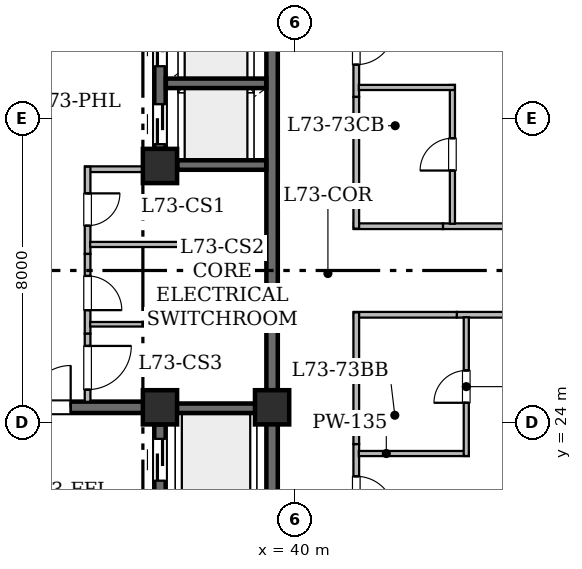
"""IFC4 building model, lengths in metres.
Left out: names, types, materials, properties, quantities, classifications, styles, units other than length and angle.
Written with IfcOpenShell. Run it as: python <this file> out.ifc"""

import sys

from ifc_helpers import new_model, si_unit, direction, frame, frame_2d, origin, origin_2d, place, context, subcontext, project, spatial, rectangle, hollow_rectangle, extrude, element, fill, save


model = new_model("IFC4")
c1 = context("Model", 3, precision=1e-05, world=origin(), true_north=direction((0.0, 1.0)))
c2 = subcontext(c1, "Body", "Model", "MODEL_VIEW")
j1 = project(units=[si_unit("LENGTHUNIT", "METRE"), si_unit("PLANEANGLEUNIT", "RADIAN")], contexts=[c1])
p1 = place(None, origin())
s1 = spatial("IfcSite", under=j1, at=p1, CompositionType="ELEMENT")
p2 = place(p1, origin())
s2 = spatial("IfcBuilding", under=s1, at=p2, CompositionType="ELEMENT")
p3 = place(p2, frame((0.0, 0.0, 286.25)))
s3 = spatial("IfcBuildingStorey", under=s2, at=p3, CompositionType="ELEMENT", Elevation=286.25)
for number, where, z_axis, x_axis in (
    (1, (36.45, 24.4, 0.0), (0.0, 0.0, 1.0), (1.0, 0.0, 0.0)),
    (2, (39.4, 24.4, 0.0), (0.0, 0.0, 1.0), (1.0, 0.0, 0.0)),
    (3, (36.45, 30.75, 0.0), (0.0, 0.0, 1.0), (1.0, 0.0, 0.0)),
):
    element("IfcColumn", number, at=place(p3, frame(where, z_axis=z_axis, x_axis=x_axis)), inside=s3, PredefinedType="COLUMN", context=c2, shape_type="SweptSolid", body=[
        extrude(hollow_rectangle(XDim=0.9, YDim=0.9, WallThickness=0.045, at=origin_2d()), origin(), (0.0, 0.0, 1.0), 4.2),
    ])
p4 = place(p3, frame((39.4, 19.0, 0.0), z_axis=(0.0, 0.0, 1.0), x_axis=(0.0, 1.0, 0.0)))
e4 = element("IfcWall", 4, at=p4, inside=s3, PredefinedType="SHEAR", context=c2, shape_type="SweptSolid", body=[
    extrude(rectangle(XDim=5.4, YDim=0.3, at=frame_2d((2.7, 0.0))), origin(), (0.0, 0.0, 1.0), 3.95),
])
p5 = place(p3, frame((39.4, 24.4, 0.0), z_axis=(0.0, 0.0, 1.0), x_axis=(0.0, 1.0, 0.0)))
e5 = element("IfcWall", 5, at=p5, inside=s3, PredefinedType="SHEAR", context=c2, shape_type="SweptSolid", body=[
    extrude(rectangle(XDim=12.6, YDim=0.3, at=frame_2d((6.3, 0.0))), origin(), (0.0, 0.0, 1.0), 3.95),
])
p6 = place(p3, frame((32.65, 24.4, 0.0), z_axis=(0.0, 0.0, 1.0), x_axis=(1.0, 0.0, 0.0)))
e6 = element("IfcWall", 6, at=p6, inside=s3, PredefinedType="SHEAR", context=c2, shape_type="SweptSolid", body=[
    extrude(rectangle(XDim=3.8, YDim=0.3, at=frame_2d((1.9, 0.0))), origin(), (0.0, 0.0, 1.0), 3.95),
])
p7 = place(p6, frame((0.35, 0.0, 0.0)))
e7 = element("IfcOpeningElement", 7, at=p7, cuts=e6, PredefinedType="OPENING", context=c2, shape_type="SweptSolid", body=[
    extrude(rectangle(XDim=1.1, YDim=2.15, at=frame_2d((0.55, 1.075))), frame((0.0, 0.16, 0.0), z_axis=(0.0, -1.0, 0.0), x_axis=(1.0, 0.0, 0.0)), (0.0, 0.0, 1.0), 0.32),
])
p8 = place(p3, frame((36.45, 19.154, 0.0), z_axis=(0.0, 0.0, 1.0), x_axis=(0.0, 1.0, 0.0)))
e8 = element("IfcWall", 8, at=p8, inside=s3, PredefinedType="SHEAR", context=c2, shape_type="SweptSolid", body=[
    extrude(rectangle(XDim=4.796, YDim=0.3, at=frame_2d((2.398, 0.0))), origin(), (0.0, 0.0, 1.0), 3.95),
])
p9 = place(p8, frame((0.696, 0.0, 0.0)))
e9 = element("IfcOpeningElement", 9, at=p9, cuts=e8, PredefinedType="OPENING", context=c2, shape_type="SweptSolid", body=[
    extrude(rectangle(XDim=1.1, YDim=2.15, at=frame_2d((0.55, 1.075))), frame((0.0, 0.16, 0.0), z_axis=(0.0, -1.0, 0.0), x_axis=(1.0, 0.0, 0.0)), (0.0, 0.0, 1.0), 0.32),
])
p10 = place(p8, frame((3.316, 0.0, 0.0)))
e10 = element("IfcOpeningElement", 10, at=p10, cuts=e8, PredefinedType="OPENING", context=c2, shape_type="SweptSolid", body=[
    extrude(rectangle(XDim=1.1, YDim=2.15, at=frame_2d((0.55, 1.075))), frame((0.0, 0.16, 0.0), z_axis=(0.0, -1.0, 0.0), x_axis=(1.0, 0.0, 0.0)), (0.0, 0.0, 1.0), 0.32),
])
p11 = place(p3, frame((36.45, 31.2, 0.0), z_axis=(0.0, 0.0, 1.0), x_axis=(0.0, 1.0, 0.0)))
e11 = element("IfcWall", 11, at=p11, inside=s3, PredefinedType="SHEAR", context=c2, shape_type="SweptSolid", body=[
    extrude(rectangle(XDim=5.646, YDim=0.3, at=frame_2d((2.823, 0.0))), origin(), (0.0, 0.0, 1.0), 3.95),
])
p12 = place(p11, frame((0.125, 0.0, 0.0)))
e12 = element("IfcOpeningElement", 12, at=p12, cuts=e11, PredefinedType="OPENING", context=c2, shape_type="SweptSolid", body=[
    extrude(rectangle(XDim=1.05, YDim=2.15, at=frame_2d((0.525, 1.075))), frame((0.0, 0.16, 0.0), z_axis=(0.0, -1.0, 0.0), x_axis=(1.0, 0.0, 0.0)), (0.0, 0.0, 1.0), 0.32),
])
p13 = place(p11, frame((2.175, 0.0, 0.0)))
e13 = element("IfcOpeningElement", 13, at=p13, cuts=e11, PredefinedType="OPENING", context=c2, shape_type="SweptSolid", body=[
    extrude(rectangle(XDim=1.05, YDim=2.15, at=frame_2d((0.525, 1.075))), frame((0.0, 0.16, 0.0), z_axis=(0.0, -1.0, 0.0), x_axis=(1.0, 0.0, 0.0)), (0.0, 0.0, 1.0), 0.32),
])
p14 = place(p11, frame((4.195, 0.0, 0.0)))
e14 = element("IfcOpeningElement", 14, at=p14, cuts=e11, PredefinedType="OPENING", context=c2, shape_type="SweptSolid", body=[
    extrude(rectangle(XDim=1.05, YDim=2.15, at=frame_2d((0.525, 1.075))), frame((0.0, 0.16, 0.0), z_axis=(0.0, -1.0, 0.0), x_axis=(1.0, 0.0, 0.0)), (0.0, 0.0, 1.0), 0.32),
])
p15 = place(p3, frame((36.604, 24.375, 0.0), z_axis=(0.0, 0.0, 1.0), x_axis=(1.0, 0.0, 0.0)))
e15 = element("IfcWall", 15, at=p15, inside=s3, PredefinedType="SHEAR", context=c2, shape_type="SweptSolid", body=[
    extrude(rectangle(XDim=2.642, YDim=0.25, at=frame_2d((1.321, 0.0))), origin(), (0.0, 0.0, 1.0), 3.95),
])
p16 = place(p3, frame((36.904, 30.775, 0.0), z_axis=(0.0, 0.0, 1.0), x_axis=(1.0, 0.0, 0.0)))
e16 = element("IfcWall", 16, at=p16, inside=s3, PredefinedType="SHEAR", context=c2, shape_type="SweptSolid", body=[
    extrude(rectangle(XDim=2.342, YDim=0.25, at=frame_2d((1.171, 0.0))), origin(), (0.0, 0.0, 1.0), 3.95),
])
p17 = place(p3, frame((36.604, 32.925, 0.0), z_axis=(0.0, 0.0, 1.0), x_axis=(1.0, 0.0, 0.0)))
e17 = element("IfcWall", 17, at=p17, inside=s3, PredefinedType="SHEAR", context=c2, shape_type="SweptSolid", body=[
    extrude(rectangle(XDim=2.642, YDim=0.25, at=frame_2d((1.321, 0.0))), origin(), (0.0, 0.0, 1.0), 3.95),
])
p18 = place(p3, frame((36.3, 30.665, 0.0), z_axis=(0.0, 0.0, 1.0), x_axis=(-1.0, 0.0, 0.0)))
e18 = element("IfcWall", 18, at=p18, inside=s3, PredefinedType="STANDARD", context=c2, shape_type="SweptSolid", body=[
    extrude(rectangle(XDim=1.82, YDim=0.15, at=frame_2d((0.91, 0.0))), origin(), (0.0, 0.0, 1.0), 3.95),
])
p19 = place(p3, frame((34.545, 30.73, 0.0), z_axis=(0.0, 0.0, 1.0), x_axis=(0.0, -1.0, 0.0)))
e19 = element("IfcWall", 19, at=p19, inside=s3, PredefinedType="STANDARD", context=c2, shape_type="SweptSolid", body=[
    extrude(rectangle(XDim=2.294, YDim=0.15, at=frame_2d((1.147, 0.0))), origin(), (0.0, 0.0, 1.0), 3.95),
])
p20 = place(p19, frame((0.701, 0.0, 0.0)))
e20 = element("IfcOpeningElement", 20, at=p20, cuts=e19, PredefinedType="OPENING", context=c2, shape_type="SweptSolid", body=[
    extrude(rectangle(XDim=0.85, YDim=2.1, at=frame_2d((0.425, 1.05))), frame((0.0, 0.085, 0.0), z_axis=(0.0, -1.0, 0.0), x_axis=(1.0, 0.0, 0.0)), (0.0, 0.0, 1.0), 0.17),
])
p21 = place(p3, frame((34.545, 28.436, 0.0), z_axis=(0.0, 0.0, 1.0), x_axis=(0.0, -1.0, 0.0)))
e21 = element("IfcWall", 21, at=p21, inside=s3, PredefinedType="STANDARD", context=c2, shape_type="SweptSolid", body=[
    extrude(rectangle(XDim=2.1, YDim=0.15, at=frame_2d((1.05, 0.0))), origin(), (0.0, 0.0, 1.0), 3.95),
])
p22 = place(p21, frame((0.579, 0.0, 0.0)))
e22 = element("IfcOpeningElement", 22, at=p22, cuts=e21, PredefinedType="OPENING", context=c2, shape_type="SweptSolid", body=[
    extrude(rectangle(XDim=0.9, YDim=2.1, at=frame_2d((0.45, 1.05))), frame((0.0, 0.085, 0.0), z_axis=(0.0, -1.0, 0.0), x_axis=(1.0, 0.0, 0.0)), (0.0, 0.0, 1.0), 0.17),
])
p23 = place(p3, frame((34.545, 26.336, 0.0), z_axis=(0.0, 0.0, 1.0), x_axis=(0.0, -1.0, 0.0)))
e23 = element("IfcWall", 23, at=p23, inside=s3, PredefinedType="STANDARD", context=c2, shape_type="SweptSolid", body=[
    extrude(rectangle(XDim=1.792, YDim=0.15, at=frame_2d((0.896, 0.0))), origin(), (0.0, 0.0, 1.0), 3.95),
])
p24 = place(p23, frame((0.321, 0.0, 0.0)))
e24 = element("IfcOpeningElement", 24, at=p24, cuts=e23, PredefinedType="OPENING", context=c2, shape_type="SweptSolid", body=[
    extrude(rectangle(XDim=1.15, YDim=2.2, at=frame_2d((0.575, 1.1))), frame((0.0, 0.085, 0.0), z_axis=(0.0, -1.0, 0.0), x_axis=(1.0, 0.0, 0.0)), (0.0, 0.0, 1.0), 0.17),
])
p25 = place(p3, frame((39.256, 28.685, 0.0), z_axis=(0.0, 0.0, 1.0), x_axis=(-1.0, 0.0, 0.0)))
e25 = element("IfcWall", 25, at=p25, inside=s3, PredefinedType="PARTITIONING", context=c2, shape_type="SweptSolid", body=[
    extrude(rectangle(XDim=4.644, YDim=0.135, at=frame_2d((2.322, 0.0))), origin(), (0.0, 0.0, 1.0), 3.95),
])
p26 = place(p3, frame((39.256, 26.585, 0.0), z_axis=(0.0, 0.0, 1.0), x_axis=(-1.0, 0.0, 0.0)))
e26 = element("IfcWall", 26, at=p26, inside=s3, PredefinedType="PARTITIONING", context=c2, shape_type="SweptSolid", body=[
    extrude(rectangle(XDim=4.644, YDim=0.12, at=frame_2d((2.322, 0.0))), origin(), (0.0, 0.0, 1.0), 3.95),
])
p27 = place(p3, frame((46.339, 26.835, 0.0), z_axis=(0.0, 0.0, 1.0), x_axis=(-1.0, 0.0, 0.0)))
e27 = element("IfcWall", 27, at=p27, inside=s3, PredefinedType="STANDARD", context=c2, shape_type="SweptSolid", body=[
    extrude(rectangle(XDim=2.078, YDim=0.15, at=frame_2d((1.039, 0.0))), origin(), (0.0, 0.0, 1.0), 3.95),
])
p28 = place(p3, frame((41.615, 23.433, 0.0), z_axis=(0.0, 0.0, 1.0), x_axis=(0.0, -1.0, 0.0)))
e28 = element("IfcWall", 28, at=p28, inside=s3, PredefinedType="STANDARD", context=c2, shape_type="SweptSolid", body=[
    extrude(rectangle(XDim=2.698, YDim=0.15, at=frame_2d((1.349, 0.0))), origin(), (0.0, 0.0, 1.0), 3.95),
])
p29 = place(p28, frame((0.849, 0.0, 0.0)))
e29 = element("IfcOpeningElement", 29, at=p29, cuts=e28, PredefinedType="OPENING", context=c2, shape_type="SweptSolid", body=[
    extrude(rectangle(XDim=1.0, YDim=2.15, at=frame_2d((0.5, 1.075))), frame((0.0, 0.085, 0.0), z_axis=(0.0, -1.0, 0.0), x_axis=(1.0, 0.0, 0.0)), (0.0, 0.0, 1.0), 0.17),
])
p30 = place(p3, frame((44.261, 26.835, 0.0), z_axis=(0.0, 0.0, 1.0), x_axis=(-1.0, 0.0, 0.0)))
e30 = element("IfcWall", 30, at=p30, inside=s3, PredefinedType="STANDARD", context=c2, shape_type="SweptSolid", body=[
    extrude(rectangle(XDim=2.711, YDim=0.15, at=frame_2d((1.355, 0.0))), origin(), (0.0, 0.0, 1.0), 3.95),
])
p31 = place(p3, frame((41.615, 26.898, 0.0), z_axis=(0.0, 0.0, 1.0), x_axis=(0.0, -1.0, 0.0)))
e31 = element("IfcWall", 31, at=p31, inside=s3, PredefinedType="STANDARD", context=c2, shape_type="SweptSolid", body=[
    extrude(rectangle(XDim=3.465, YDim=0.15, at=frame_2d((1.732, 0.0))), origin(), (0.0, 0.0, 1.0), 3.245),
])
p32 = place(p3, frame((43.896, 29.165, 0.0), z_axis=(0.0, 0.0, 1.0), x_axis=(1.0, 0.0, 0.0)))
e32 = element("IfcWall", 32, at=p32, inside=s3, PredefinedType="STANDARD", context=c2, shape_type="SweptSolid", body=[
    extrude(rectangle(XDim=2.078, YDim=0.15, at=frame_2d((1.039, 0.0))), origin(), (0.0, 0.0, 1.0), 3.95),
])
p33 = place(p3, frame((41.615, 35.265, 0.0), z_axis=(0.0, 0.0, 1.0), x_axis=(0.0, -1.0, 0.0)))
e33 = element("IfcWall", 33, at=p33, inside=s3, PredefinedType="STANDARD", context=c2, shape_type="SweptSolid", body=[
    extrude(rectangle(XDim=2.698, YDim=0.15, at=frame_2d((1.349, 0.0))), origin(), (0.0, 0.0, 1.0), 3.95),
])
p34 = place(p33, frame((0.849, 0.0, 0.0)))
e34 = element("IfcOpeningElement", 34, at=p34, cuts=e33, PredefinedType="OPENING", context=c2, shape_type="SweptSolid", body=[
    extrude(rectangle(XDim=1.0, YDim=2.15, at=frame_2d((0.5, 1.075))), frame((0.0, 0.085, 0.0), z_axis=(0.0, -1.0, 0.0), x_axis=(1.0, 0.0, 0.0)), (0.0, 0.0, 1.0), 0.17),
])
p35 = place(p3, frame((41.55, 29.165, 0.0), z_axis=(0.0, 0.0, 1.0), x_axis=(1.0, 0.0, 0.0)))
e35 = element("IfcWall", 35, at=p35, inside=s3, PredefinedType="STANDARD", context=c2, shape_type="SweptSolid", body=[
    extrude(rectangle(XDim=2.346, YDim=0.15, at=frame_2d((1.173, 0.0))), origin(), (0.0, 0.0, 1.0), 3.95),
])
p36 = place(p3, frame((41.615, 32.567, 0.0), z_axis=(0.0, 0.0, 1.0), x_axis=(0.0, -1.0, 0.0)))
e36 = element("IfcWall", 36, at=p36, inside=s3, PredefinedType="STANDARD", context=c2, shape_type="SweptSolid", body=[
    extrude(rectangle(XDim=3.465, YDim=0.15, at=frame_2d((1.732, 0.0))), origin(), (0.0, 0.0, 1.0), 3.95),
])
p37 = place(p3, frame((41.682, 23.184, 0.0), z_axis=(0.0, 0.0, 1.0), x_axis=(1.0, 0.0, 0.0)))
e37 = element("IfcWall", 37, at=p37, inside=s3, PredefinedType="PARTITIONING", context=c2, shape_type="SweptSolid", body=[
    extrude(rectangle(XDim=2.893, YDim=0.135, at=frame_2d((1.447, 0.0))), origin(), (0.0, 0.0, 1.0), 3.245),
])
p38 = place(p3, frame((44.51, 23.119, 0.0), z_axis=(0.0, 0.0, 1.0), x_axis=(0.0, 1.0, 0.0)))
e38 = element("IfcWall", 38, at=p38, inside=s3, PredefinedType="PARTITIONING", context=c2, shape_type="SweptSolid", body=[
    extrude(rectangle(XDim=3.651, YDim=0.135, at=frame_2d((1.826, 0.0))), origin(), (0.0, 0.0, 1.0), 3.245),
])
p39 = place(p38, frame((1.4, 0.0, 0.0)))
e39 = element("IfcOpeningElement", 39, at=p39, cuts=e38, PredefinedType="OPENING", context=c2, shape_type="SweptSolid", body=[
    extrude(rectangle(XDim=0.85, YDim=2.1, at=frame_2d((0.425, 1.05))), frame((0.0, 0.077, 0.0), z_axis=(0.0, -1.0, 0.0), x_axis=(1.0, 0.0, 0.0)), (0.0, 0.0, 1.0), 0.155),
])
p40 = place(p3, frame((44.145, 29.23, 0.0), z_axis=(0.0, 0.0, 1.0), x_axis=(0.0, 1.0, 0.0)))
e40 = element("IfcWall", 40, at=p40, inside=s3, PredefinedType="PARTITIONING", context=c2, shape_type="SweptSolid", body=[
    extrude(rectangle(XDim=3.651, YDim=0.135, at=frame_2d((1.826, 0.0))), origin(), (0.0, 0.0, 1.0), 3.95),
])
p41 = place(p40, frame((1.4, 0.0, 0.0)))
e41 = element("IfcOpeningElement", 41, at=p41, cuts=e40, PredefinedType="OPENING", context=c2, shape_type="SweptSolid", body=[
    extrude(rectangle(XDim=0.85, YDim=2.1, at=frame_2d((0.425, 1.05))), frame((0.0, 0.077, 0.0), z_axis=(0.0, -1.0, 0.0), x_axis=(1.0, 0.0, 0.0)), (0.0, 0.0, 1.0), 0.155),
])
p42 = place(p3, frame((44.21, 32.816, 0.0), z_axis=(0.0, 0.0, 1.0), x_axis=(-1.0, 0.0, 0.0)))
e42 = element("IfcWall", 42, at=p42, inside=s3, PredefinedType="PARTITIONING", context=c2, shape_type="SweptSolid", body=[
    extrude(rectangle(XDim=2.528, YDim=0.135, at=frame_2d((1.264, 0.0))), origin(), (0.0, 0.0, 1.0), 3.95),
])
p43 = place(p7, origin())
e43 = element("IfcDoor", 43, at=p43, inside=s3, OperationType="SINGLE_SWING_RIGHT", PredefinedType="DOOR", context=c2, shape_type="SweptSolid", body=[
    extrude(rectangle(XDim=1.1, YDim=2.15, at=frame_2d((0.55, 1.075))), frame((0.0, 0.025, 0.0), z_axis=(0.0, -1.0, 0.0), x_axis=(1.0, 0.0, 0.0)), (0.0, 0.0, 1.0), 0.05),
])
fill(e7, e43)
p44 = place(p10, origin())
e44 = element("IfcDoor", 44, at=p44, inside=s3, OperationType="SLIDING_TO_LEFT", PredefinedType="DOOR", context=c2, shape_type="SweptSolid", body=[
    extrude(rectangle(XDim=1.1, YDim=2.15, at=frame_2d((0.55, 1.075))), frame((0.0, 0.025, 0.0), z_axis=(0.0, -1.0, 0.0), x_axis=(1.0, 0.0, 0.0)), (0.0, 0.0, 1.0), 0.05),
])
fill(e10, e44)
p45 = place(p12, origin())
e45 = element("IfcDoor", 45, at=p45, inside=s3, OperationType="SLIDING_TO_LEFT", PredefinedType="DOOR", context=c2, shape_type="SweptSolid", body=[
    extrude(rectangle(XDim=1.05, YDim=2.15, at=frame_2d((0.525, 1.075))), frame((0.0, 0.025, 0.0), z_axis=(0.0, -1.0, 0.0), x_axis=(1.0, 0.0, 0.0)), (0.0, 0.0, 1.0), 0.05),
])
fill(e12, e45)
p46 = place(p13, origin())
e46 = element("IfcDoor", 46, at=p46, inside=s3, OperationType="SLIDING_TO_LEFT", PredefinedType="DOOR", context=c2, shape_type="SweptSolid", body=[
    extrude(rectangle(XDim=1.05, YDim=2.15, at=frame_2d((0.525, 1.075))), frame((0.0, 0.025, 0.0), z_axis=(0.0, -1.0, 0.0), x_axis=(1.0, 0.0, 0.0)), (0.0, 0.0, 1.0), 0.05),
])
fill(e13, e46)
p47 = place(p20, origin())
e47 = element("IfcDoor", 47, at=p47, inside=s3, OperationType="SINGLE_SWING_LEFT", PredefinedType="DOOR", context=c2, shape_type="SweptSolid", body=[
    extrude(rectangle(XDim=0.85, YDim=2.1, at=frame_2d((0.425, 1.05))), frame((0.0, 0.025, 0.0), z_axis=(0.0, -1.0, 0.0), x_axis=(1.0, 0.0, 0.0)), (0.0, 0.0, 1.0), 0.05),
])
fill(e20, e47)
p48 = place(p22, origin())
e48 = element("IfcDoor", 48, at=p48, inside=s3, OperationType="SINGLE_SWING_RIGHT", PredefinedType="DOOR", context=c2, shape_type="SweptSolid", body=[
    extrude(rectangle(XDim=0.9, YDim=2.1, at=frame_2d((0.45, 1.05))), frame((0.0, 0.025, 0.0), z_axis=(0.0, -1.0, 0.0), x_axis=(1.0, 0.0, 0.0)), (0.0, 0.0, 1.0), 0.05),
])
fill(e22, e48)
p49 = place(p24, origin())
e49 = element("IfcDoor", 49, at=p49, inside=s3, OperationType="SINGLE_SWING_LEFT", PredefinedType="DOOR", context=c2, shape_type="SweptSolid", body=[
    extrude(rectangle(XDim=1.15, YDim=2.2, at=frame_2d((0.575, 1.1))), frame((0.0, 0.025, 0.0), z_axis=(0.0, -1.0, 0.0), x_axis=(1.0, 0.0, 0.0)), (0.0, 0.0, 1.0), 0.05),
])
fill(e24, e49)
p50 = place(p29, origin())
e50 = element("IfcDoor", 50, at=p50, inside=s3, OperationType="SINGLE_SWING_RIGHT", PredefinedType="DOOR", context=c2, shape_type="SweptSolid", body=[
    extrude(rectangle(XDim=1.0, YDim=2.15, at=frame_2d((0.5, 1.075))), frame((0.0, 0.025, 0.0), z_axis=(0.0, -1.0, 0.0), x_axis=(1.0, 0.0, 0.0)), (0.0, 0.0, 1.0), 0.05),
])
fill(e29, e50)
p51 = place(p34, origin())
e51 = element("IfcDoor", 51, at=p51, inside=s3, OperationType="SINGLE_SWING_LEFT", PredefinedType="DOOR", context=c2, shape_type="SweptSolid", body=[
    extrude(rectangle(XDim=1.0, YDim=2.15, at=frame_2d((0.5, 1.075))), frame((0.0, 0.025, 0.0), z_axis=(0.0, -1.0, 0.0), x_axis=(1.0, 0.0, 0.0)), (0.0, 0.0, 1.0), 0.05),
])
fill(e34, e51)
p52 = place(p39, origin())
e52 = element("IfcDoor", 52, at=p52, inside=s3, OperationType="SINGLE_SWING_LEFT", PredefinedType="DOOR", context=c2, shape_type="SweptSolid", body=[
    extrude(rectangle(XDim=0.85, YDim=2.1, at=frame_2d((0.425, 1.05))), frame((0.0, 0.025, 0.0), z_axis=(0.0, -1.0, 0.0), x_axis=(1.0, 0.0, 0.0)), (0.0, 0.0, 1.0), 0.05),
])
fill(e39, e52)
p53 = place(p41, origin())
e53 = element("IfcDoor", 53, at=p53, inside=s3, OperationType="SINGLE_SWING_LEFT", PredefinedType="DOOR", context=c2, shape_type="SweptSolid", body=[
    extrude(rectangle(XDim=0.85, YDim=2.1, at=frame_2d((0.425, 1.05))), frame((0.0, 0.025, 0.0), z_axis=(0.0, -1.0, 0.0), x_axis=(1.0, 0.0, 0.0)), (0.0, 0.0, 1.0), 0.05),
])
fill(e41, e53)
save(model, sys.argv[1])
